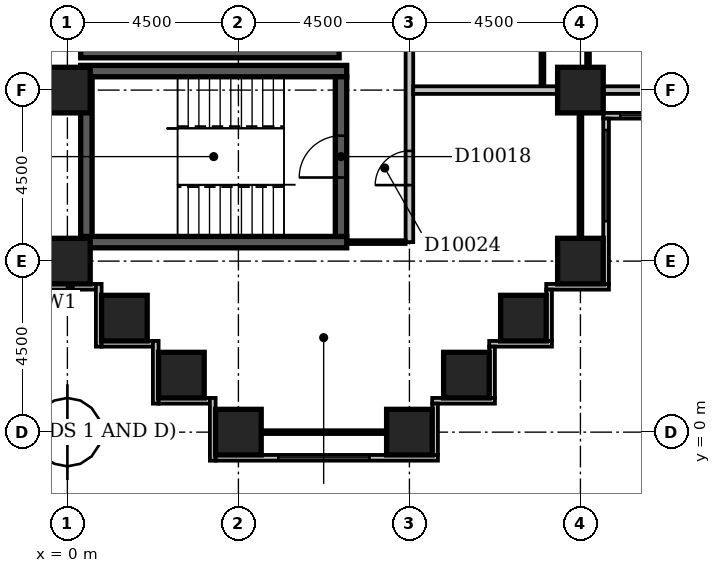
"""IFC4 building model, lengths in metres.
Left out: names, types, materials, properties, quantities, classifications, styles, units other than length and angle.
Written with IfcOpenShell. Run it as: python <this file> out.ifc"""

import sys

from ifc_helpers import new_model, si_unit, direction, frame, frame_2d, origin, origin_2d, place, context, subcontext, project, spatial, rectangle, extrude, element, fill, save


model = new_model("IFC4")
c1 = context("Model", 3, precision=1e-05, world=origin(), true_north=direction((0.0, 1.0)))
c2 = subcontext(c1, "Body", "Model", "MODEL_VIEW")
j1 = project(units=[si_unit("LENGTHUNIT", "METRE"), si_unit("PLANEANGLEUNIT", "RADIAN")], contexts=[c1])
p1 = place(None, origin())
s1 = spatial("IfcSite", under=j1, at=p1, CompositionType="ELEMENT")
p2 = place(p1, origin())
s2 = spatial("IfcBuilding", under=s1, at=p2, CompositionType="ELEMENT")
p3 = place(p2, frame((0.0, 0.0, 47.0)))
s3 = spatial("IfcBuildingStorey", under=s2, at=p3, CompositionType="ELEMENT", Elevation=47.0)
for number, where, z_axis, x_axis in (
    (1, (0.35, 5.0, -0.3), (0.0, 0.0, 1.0), (1.0, 0.0, 0.0)),
    (2, (0.35, 9.5, -0.3), (0.0, 0.0, 1.0), (1.0, 0.0, 0.0)),
):
    element("IfcWall", number, at=place(p3, frame(where, z_axis=z_axis, x_axis=x_axis)), inside=s3, PredefinedType="SHEAR", context=c2, shape_type="SweptSolid", body=[
        extrude(rectangle(XDim=7.0, YDim=0.3, at=frame_2d((3.5, 0.0))), origin(), (0.0, 0.0, 1.0), 3.6),
    ])
p4 = place(p3, frame((0.35, 10.0, -0.3), z_axis=(0.0, 0.0, 1.0), x_axis=(1.0, 0.0, 0.0)))
e3 = element("IfcWall", 3, at=p4, inside=s3, PredefinedType="SHEAR", context=c2, shape_type="SweptSolid", body=[
    extrude(rectangle(XDim=6.8, YDim=0.3, at=frame_2d((3.4, 0.0))), origin(), (0.0, 0.0, 1.0), 3.6),
])
p5 = place(p3, frame((0.5, 5.15, -0.3), z_axis=(0.0, 0.0, 1.0), x_axis=(0.0, 1.0, 0.0)))
e4 = element("IfcWall", 4, at=p5, inside=s3, PredefinedType="SHEAR", context=c2, shape_type="SweptSolid", body=[
    extrude(rectangle(XDim=4.2, YDim=0.3, at=frame_2d((2.1, 0.0))), origin(), (0.0, 0.0, 1.0), 3.6),
])
p6 = place(p3, frame((7.2, 5.15, -0.3), z_axis=(0.0, 0.0, 1.0), x_axis=(0.0, 1.0, 0.0)))
e5 = element("IfcWall", 5, at=p6, inside=s3, PredefinedType="SHEAR", context=c2, shape_type="SweptSolid", body=[
    extrude(rectangle(XDim=4.2, YDim=0.3, at=frame_2d((2.1, 0.0))), origin(), (0.0, 0.0, 1.0), 3.6),
])
p7 = place(p6, frame((1.55, 0.0, 0.3)))
e6 = element("IfcOpeningElement", 6, at=p7, cuts=e5, PredefinedType="OPENING", context=c2, shape_type="SweptSolid", body=[
    extrude(rectangle(XDim=1.1, YDim=2.1, at=frame_2d((0.55, 1.05))), frame((0.0, 0.162, 0.0), z_axis=(0.0, -1.0, 0.0), x_axis=(1.0, 0.0, 0.0)), (0.0, 0.0, 1.0), 0.324),
])
for number, where, z_axis, x_axis in (
    (7, (4.5, 0.0, -0.3), (0.0, 0.0, 1.0), (1.0, 0.0, 0.0)),
    (8, (9.0, 0.0, -0.3), (0.0, 0.0, 1.0), (1.0, 0.0, 0.0)),
    (9, (3.0, 1.5, -0.3), (0.0, 0.0, 1.0), (1.0, 0.0, 0.0)),
    (10, (10.5, 1.5, -0.3), (0.0, 0.0, 1.0), (1.0, 0.0, 0.0)),
    (11, (1.5, 3.0, -0.3), (0.0, 0.0, 1.0), (1.0, 0.0, 0.0)),
    (12, (12.0, 3.0, -0.3), (0.0, 0.0, 1.0), (1.0, 0.0, 0.0)),
    (13, (0.0, 4.5, -0.3), (0.0, 0.0, 1.0), (1.0, 0.0, 0.0)),
    (14, (13.5, 4.5, -0.3), (0.0, 0.0, 1.0), (1.0, 0.0, 0.0)),
    (15, (0.0, 9.0, -0.3), (0.0, 0.0, 1.0), (1.0, 0.0, 0.0)),
    (16, (13.5, 9.0, -0.3), (0.0, 0.0, 1.0), (1.0, 0.0, 0.0)),
):
    element("IfcColumn", number, at=place(p3, frame(where, z_axis=z_axis, x_axis=x_axis)), inside=s3, PredefinedType="COLUMN", context=c2, shape_type="SweptSolid", body=[
        extrude(rectangle(XDim=1.2, YDim=1.2, at=origin_2d()), origin(), (0.0, 0.0, 1.0), 3.6),
    ])
p8 = place(p3, frame((9.675, -0.6, 0.0), z_axis=(0.0, 0.0, 1.0), x_axis=(0.0, 1.0, 0.0)))
e17 = element("IfcWall", 17, at=p8, inside=s3, PredefinedType="STANDARD", context=c2, shape_type="SweptSolid", body=[
    extrude(rectangle(XDim=1.35, YDim=0.15, at=frame_2d((0.675, 0.0))), origin(), (0.0, 0.0, 1.0), 2.7),
])
p9 = place(p3, frame((9.6, 0.825, 0.0), z_axis=(0.0, 0.0, 1.0), x_axis=(1.0, 0.0, 0.0)))
e18 = element("IfcWall", 18, at=p9, inside=s3, PredefinedType="STANDARD", context=c2, shape_type="SweptSolid", body=[
    extrude(rectangle(XDim=1.65, YDim=0.15, at=frame_2d((0.825, 0.0))), origin(), (0.0, 0.0, 1.0), 2.7),
])
p10 = place(p3, frame((11.175, 0.9, 0.0), z_axis=(0.0, 0.0, 1.0), x_axis=(0.0, 1.0, 0.0)))
e19 = element("IfcWall", 19, at=p10, inside=s3, PredefinedType="STANDARD", context=c2, shape_type="SweptSolid", body=[
    extrude(rectangle(XDim=1.35, YDim=0.15, at=frame_2d((0.675, 0.0))), origin(), (0.0, 0.0, 1.0), 2.7),
])
p11 = place(p3, frame((11.1, 2.325, 0.0), z_axis=(0.0, 0.0, 1.0), x_axis=(1.0, 0.0, 0.0)))
e20 = element("IfcWall", 20, at=p11, inside=s3, PredefinedType="STANDARD", context=c2, shape_type="SweptSolid", body=[
    extrude(rectangle(XDim=1.65, YDim=0.15, at=frame_2d((0.825, 0.0))), origin(), (0.0, 0.0, 1.0), 2.7),
])
p12 = place(p3, frame((12.675, 2.4, 0.0), z_axis=(0.0, 0.0, 1.0), x_axis=(0.0, 1.0, 0.0)))
e21 = element("IfcWall", 21, at=p12, inside=s3, PredefinedType="STANDARD", context=c2, shape_type="SweptSolid", body=[
    extrude(rectangle(XDim=1.35, YDim=0.15, at=frame_2d((0.675, 0.0))), origin(), (0.0, 0.0, 1.0), 2.7),
])
p13 = place(p3, frame((12.6, 3.825, 0.0), z_axis=(0.0, 0.0, 1.0), x_axis=(1.0, 0.0, 0.0)))
e22 = element("IfcWall", 22, at=p13, inside=s3, PredefinedType="STANDARD", context=c2, shape_type="SweptSolid", body=[
    extrude(rectangle(XDim=1.65, YDim=0.15, at=frame_2d((0.825, 0.0))), origin(), (0.0, 0.0, 1.0), 2.7),
])
p14 = place(p3, frame((14.175, 3.9, 0.0), z_axis=(0.0, 0.0, 1.0), x_axis=(0.0, 1.0, 0.0)))
e23 = element("IfcWall", 23, at=p14, inside=s3, PredefinedType="STANDARD", context=c2, shape_type="SweptSolid", body=[
    extrude(rectangle(XDim=4.35, YDim=0.15, at=frame_2d((2.175, 0.0))), origin(), (0.0, 0.0, 1.0), 2.7),
])
p15 = place(p14, frame((1.65, 0.0, 0.6)))
e24 = element("IfcOpeningElement", 24, at=p15, cuts=e23, PredefinedType="OPENING", context=c2, shape_type="SweptSolid", body=[
    extrude(rectangle(XDim=2.4, YDim=1.8, at=frame_2d((1.2, 0.9))), frame((0.0, 0.087, 0.0), z_axis=(0.0, -1.0, 0.0), x_axis=(1.0, 0.0, 0.0)), (0.0, 0.0, 1.0), 0.174),
])
p16 = place(p3, frame((14.1, 8.325, 0.0), z_axis=(0.0, 0.0, 1.0), x_axis=(1.0, 0.0, 0.0)))
e25 = element("IfcWall", 25, at=p16, inside=s3, PredefinedType="STANDARD", context=c2, shape_type="SweptSolid", body=[
    extrude(rectangle(XDim=4.65, YDim=0.15, at=frame_2d((2.325, 0.0))), origin(), (0.0, 0.0, 1.0), 2.7),
])
p17 = place(p16, frame((0.45, 0.0, 0.6)))
e26 = element("IfcOpeningElement", 26, at=p17, cuts=e25, PredefinedType="OPENING", context=c2, shape_type="SweptSolid", body=[
    extrude(rectangle(XDim=2.4, YDim=1.8, at=frame_2d((1.2, 0.9))), frame((0.0, 0.087, 0.0), z_axis=(0.0, -1.0, 0.0), x_axis=(1.0, 0.0, 0.0)), (0.0, 0.0, 1.0), 0.174),
])
p18 = place(p3, frame((-0.6, 3.825, 0.0), z_axis=(0.0, 0.0, 1.0), x_axis=(1.0, 0.0, 0.0)))
e27 = element("IfcWall", 27, at=p18, inside=s3, PredefinedType="STANDARD", context=c2, shape_type="SweptSolid", body=[
    extrude(rectangle(XDim=1.35, YDim=0.15, at=frame_2d((0.675, 0.0))), origin(), (0.0, 0.0, 1.0), 2.7),
])
p19 = place(p3, frame((0.825, 3.9, 0.0), z_axis=(0.0, 0.0, 1.0), x_axis=(0.0, -1.0, 0.0)))
e28 = element("IfcWall", 28, at=p19, inside=s3, PredefinedType="STANDARD", context=c2, shape_type="SweptSolid", body=[
    extrude(rectangle(XDim=1.65, YDim=0.15, at=frame_2d((0.825, 0.0))), origin(), (0.0, 0.0, 1.0), 2.7),
])
p20 = place(p3, frame((0.9, 2.325, 0.0), z_axis=(0.0, 0.0, 1.0), x_axis=(1.0, 0.0, 0.0)))
e29 = element("IfcWall", 29, at=p20, inside=s3, PredefinedType="STANDARD", context=c2, shape_type="SweptSolid", body=[
    extrude(rectangle(XDim=1.35, YDim=0.15, at=frame_2d((0.675, 0.0))), origin(), (0.0, 0.0, 1.0), 2.7),
])
p21 = place(p3, frame((2.325, 2.4, 0.0), z_axis=(0.0, 0.0, 1.0), x_axis=(0.0, -1.0, 0.0)))
e30 = element("IfcWall", 30, at=p21, inside=s3, PredefinedType="STANDARD", context=c2, shape_type="SweptSolid", body=[
    extrude(rectangle(XDim=1.65, YDim=0.15, at=frame_2d((0.825, 0.0))), origin(), (0.0, 0.0, 1.0), 2.7),
])
p22 = place(p3, frame((2.4, 0.825, 0.0), z_axis=(0.0, 0.0, 1.0), x_axis=(1.0, 0.0, 0.0)))
e31 = element("IfcWall", 31, at=p22, inside=s3, PredefinedType="STANDARD", context=c2, shape_type="SweptSolid", body=[
    extrude(rectangle(XDim=1.35, YDim=0.15, at=frame_2d((0.675, 0.0))), origin(), (0.0, 0.0, 1.0), 2.7),
])
p23 = place(p3, frame((3.825, 0.9, 0.0), z_axis=(0.0, 0.0, 1.0), x_axis=(0.0, -1.0, 0.0)))
e32 = element("IfcWall", 32, at=p23, inside=s3, PredefinedType="STANDARD", context=c2, shape_type="SweptSolid", body=[
    extrude(rectangle(XDim=1.65, YDim=0.15, at=frame_2d((0.825, 0.0))), origin(), (0.0, 0.0, 1.0), 2.7),
])
p24 = place(p3, frame((3.9, -0.675, 0.0), z_axis=(0.0, 0.0, 1.0), x_axis=(1.0, 0.0, 0.0)))
e33 = element("IfcWall", 33, at=p24, inside=s3, PredefinedType="STANDARD", context=c2, shape_type="SweptSolid", body=[
    extrude(rectangle(XDim=5.85, YDim=0.15, at=frame_2d((2.925, 0.0))), origin(), (0.0, 0.0, 1.0), 2.7),
])
p25 = place(p24, frame((1.65, 0.0, 0.6)))
e34 = element("IfcOpeningElement", 34, at=p25, cuts=e33, PredefinedType="OPENING", context=c2, shape_type="SweptSolid", body=[
    extrude(rectangle(XDim=2.4, YDim=1.8, at=frame_2d((1.2, 0.9))), frame((0.0, 0.087, 0.0), z_axis=(0.0, -1.0, 0.0), x_axis=(1.0, 0.0, 0.0)), (0.0, 0.0, 1.0), 0.174),
])
p26 = place(p3, frame((5.1, 0.0, 0.0), z_axis=(0.0, 0.0, 1.0), x_axis=(1.0, 0.0, 0.0)))
e35 = element("IfcWall", 35, at=p26, inside=s3, PredefinedType="PARTITIONING", context=c2, shape_type="SweptSolid", body=[
    extrude(rectangle(XDim=3.3, YDim=0.1, at=frame_2d((1.65, 0.0))), origin(), (0.0, 0.0, 1.0), 2.7),
])
p27 = place(p3, frame((0.0, 4.4, 0.0), z_axis=(0.0, 0.0, 1.0), x_axis=(0.0, 1.0, 0.0)))
e36 = element("IfcWall", 36, at=p27, inside=s3, PredefinedType="PARTITIONING", context=c2, shape_type="SweptSolid", body=[
    extrude(rectangle(XDim=0.7, YDim=0.1, at=frame_2d((0.35, 0.0))), origin(), (0.0, 0.0, 1.0), 2.7),
])
p28 = place(p3, frame((7.349, 5.0, 0.0), z_axis=(0.0, 0.0, 1.0), x_axis=(1.0, 0.0, 0.0)))
e37 = element("IfcWall", 37, at=p28, inside=s3, PredefinedType="PARTITIONING", context=c2, shape_type="SweptSolid", body=[
    extrude(rectangle(XDim=1.551, YDim=0.1, at=frame_2d((0.775, 0.0))), origin(), (0.0, 0.0, 1.0), 3.3),
])
p29 = place(p3, frame((9.0, 5.0, 0.0), z_axis=(0.0, 0.0, 1.0), x_axis=(0.0, 1.0, 0.0)))
e38 = element("IfcWall", 38, at=p29, inside=s3, PredefinedType="PARTITIONING", context=c2, shape_type="SweptSolid", body=[
    extrude(rectangle(XDim=44.5, YDim=0.2, at=frame_2d((22.25, 0.0))), origin(), (0.0, 0.0, 1.0), 3.3),
])
p30 = place(p29, frame((28.45, 0.0, 0.0)))
e39 = element("IfcOpeningElement", 39, at=p30, cuts=e38, PredefinedType="OPENING", context=c2, shape_type="SweptSolid", body=[
    extrude(rectangle(XDim=1.0, YDim=2.1, at=frame_2d((0.5, 1.05))), frame((0.0, 0.112, 0.0), z_axis=(0.0, -1.0, 0.0), x_axis=(1.0, 0.0, 0.0)), (0.0, 0.0, 1.0), 0.224),
])
p31 = place(p29, frame((17.8, 0.0, 0.0)))
e40 = element("IfcOpeningElement", 40, at=p31, cuts=e38, PredefinedType="OPENING", context=c2, shape_type="SweptSolid", body=[
    extrude(rectangle(XDim=1.0, YDim=2.1, at=frame_2d((0.5, 1.05))), frame((0.0, 0.112, 0.0), z_axis=(0.0, -1.0, 0.0), x_axis=(1.0, 0.0, 0.0)), (0.0, 0.0, 1.0), 0.224),
])
p32 = place(p29, frame((14.55, 0.0, 0.0)))
e41 = element("IfcOpeningElement", 41, at=p32, cuts=e38, PredefinedType="OPENING", context=c2, shape_type="SweptSolid", body=[
    extrude(rectangle(XDim=1.0, YDim=2.1, at=frame_2d((0.5, 1.05))), frame((0.0, 0.112, 0.0), z_axis=(0.0, -1.0, 0.0), x_axis=(1.0, 0.0, 0.0)), (0.0, 0.0, 1.0), 0.224),
])
p33 = place(p29, frame((11.7, 0.0, 0.0)))
e42 = element("IfcOpeningElement", 42, at=p33, cuts=e38, PredefinedType="OPENING", context=c2, shape_type="SweptSolid", body=[
    extrude(rectangle(XDim=1.0, YDim=2.1, at=frame_2d((0.5, 1.05))), frame((0.0, 0.112, 0.0), z_axis=(0.0, -1.0, 0.0), x_axis=(1.0, 0.0, 0.0)), (0.0, 0.0, 1.0), 0.224),
])
p34 = place(p29, frame((35.0, 0.0, 0.0)))
e43 = element("IfcOpeningElement", 43, at=p34, cuts=e38, PredefinedType="OPENING", context=c2, shape_type="SweptSolid", body=[
    extrude(rectangle(XDim=0.9, YDim=2.1, at=frame_2d((0.45, 1.05))), frame((0.0, 0.112, 0.0), z_axis=(0.0, -1.0, 0.0), x_axis=(1.0, 0.0, 0.0)), (0.0, 0.0, 1.0), 0.224),
])
p35 = place(p29, frame((1.5, 0.0, 0.0)))
e44 = element("IfcOpeningElement", 44, at=p35, cuts=e38, PredefinedType="OPENING", context=c2, shape_type="SweptSolid", body=[
    extrude(rectangle(XDim=0.9, YDim=2.1, at=frame_2d((0.45, 1.05))), frame((0.0, 0.112, 0.0), z_axis=(0.0, -1.0, 0.0), x_axis=(1.0, 0.0, 0.0)), (0.0, 0.0, 1.0), 0.224),
])
p36 = place(p3, frame((13.5, 5.1, 0.0), z_axis=(0.0, 0.0, 1.0), x_axis=(0.0, 1.0, 0.0)))
e45 = element("IfcWall", 45, at=p36, inside=s3, PredefinedType="PARTITIONING", context=c2, shape_type="SweptSolid", body=[
    extrude(rectangle(XDim=3.3, YDim=0.1, at=frame_2d((1.65, 0.0))), origin(), (0.0, 0.0, 1.0), 2.7),
])
p37 = place(p3, frame((9.1, 9.0, 0.0), z_axis=(0.0, 0.0, 1.0), x_axis=(1.0, 0.0, 0.0)))
e46 = element("IfcWall", 46, at=p37, inside=s3, PredefinedType="PARTITIONING", context=c2, shape_type="SweptSolid", body=[
    extrude(rectangle(XDim=3.8, YDim=0.2, at=frame_2d((1.9, 0.0))), origin(), (0.0, 0.0, 1.0), 3.3),
])
p38 = place(p3, frame((14.1, 9.0, 0.0), z_axis=(0.0, 0.0, 1.0), x_axis=(1.0, 0.0, 0.0)))
e47 = element("IfcWall", 47, at=p38, inside=s3, PredefinedType="PARTITIONING", context=c2, shape_type="SweptSolid", body=[
    extrude(rectangle(XDim=3.3, YDim=0.2, at=frame_2d((1.65, 0.0))), origin(), (0.0, 0.0, 1.0), 2.7),
])
p39 = place(p3, frame((12.5, 9.1, 0.0), z_axis=(0.0, 0.0, 1.0), x_axis=(0.0, 1.0, 0.0)))
e48 = element("IfcWall", 48, at=p39, inside=s3, PredefinedType="PARTITIONING", context=c2, shape_type="SweptSolid", body=[
    extrude(rectangle(XDim=7.3, YDim=0.1, at=frame_2d((3.65, 0.0))), origin(), (0.0, 0.0, 1.0), 3.3),
])
p40 = place(p39, frame((5.7, 0.0, 0.0)))
e49 = element("IfcOpeningElement", 49, at=p40, cuts=e48, PredefinedType="OPENING", context=c2, shape_type="SweptSolid", body=[
    extrude(rectangle(XDim=0.8, YDim=2.1, at=frame_2d((0.4, 1.05))), frame((0.0, 0.062, 0.0), z_axis=(0.0, -1.0, 0.0), x_axis=(1.0, 0.0, 0.0)), (0.0, 0.0, 1.0), 0.124),
])
p41 = place(p39, frame((1.95, 0.0, 0.0)))
e50 = element("IfcOpeningElement", 50, at=p41, cuts=e48, PredefinedType="OPENING", context=c2, shape_type="SweptSolid", body=[
    extrude(rectangle(XDim=0.9, YDim=2.1, at=frame_2d((0.45, 1.05))), frame((0.0, 0.062, 0.0), z_axis=(0.0, -1.0, 0.0), x_axis=(1.0, 0.0, 0.0)), (0.0, 0.0, 1.0), 0.124),
])
p42 = place(p3, frame((13.7, 9.6, 0.0), z_axis=(0.0, 0.0, 1.0), x_axis=(0.0, 1.0, 0.0)))
e51 = element("IfcWall", 51, at=p42, inside=s3, PredefinedType="PARTITIONING", context=c2, shape_type="SweptSolid", body=[
    extrude(rectangle(XDim=8.3, YDim=0.1, at=frame_2d((4.15, 0.0))), origin(), (0.0, 0.0, 1.0), 3.3),
])
p43 = place(p42, frame((1.2, 0.0, 0.0)))
e52 = element("IfcOpeningElement", 52, at=p43, cuts=e51, PredefinedType="OPENING", context=c2, shape_type="SweptSolid", body=[
    extrude(rectangle(XDim=0.9, YDim=2.1, at=frame_2d((0.45, 1.05))), frame((0.0, 0.062, 0.0), z_axis=(0.0, -1.0, 0.0), x_axis=(1.0, 0.0, 0.0)), (0.0, 0.0, 1.0), 0.124),
])
p44 = place(p42, frame((5.7, 0.0, 0.0)))
e53 = element("IfcOpeningElement", 53, at=p44, cuts=e51, PredefinedType="OPENING", context=c2, shape_type="SweptSolid", body=[
    extrude(rectangle(XDim=0.9, YDim=2.1, at=frame_2d((0.45, 1.05))), frame((0.0, 0.062, 0.0), z_axis=(0.0, -1.0, 0.0), x_axis=(1.0, 0.0, 0.0)), (0.0, 0.0, 1.0), 0.124),
])
p45 = place(p15, origin())
e54 = element("IfcWindow", 54, at=p45, inside=s3, PartitioningType="SINGLE_PANEL", PredefinedType="WINDOW", context=c2, shape_type="SweptSolid", body=[
    extrude(rectangle(XDim=2.4, YDim=1.8, at=frame_2d((1.2, 0.9))), frame((0.0, 0.03, 0.0), z_axis=(0.0, -1.0, 0.0), x_axis=(1.0, 0.0, 0.0)), (0.0, 0.0, 1.0), 0.06),
])
fill(e24, e54)
p46 = place(p17, origin())
e55 = element("IfcWindow", 55, at=p46, inside=s3, PartitioningType="SINGLE_PANEL", PredefinedType="WINDOW", context=c2, shape_type="SweptSolid", body=[
    extrude(rectangle(XDim=2.4, YDim=1.8, at=frame_2d((1.2, 0.9))), frame((0.0, 0.03, 0.0), z_axis=(0.0, -1.0, 0.0), x_axis=(1.0, 0.0, 0.0)), (0.0, 0.0, 1.0), 0.06),
])
fill(e26, e55)
p47 = place(p25, origin())
e56 = element("IfcWindow", 56, at=p47, inside=s3, PartitioningType="SINGLE_PANEL", PredefinedType="WINDOW", context=c2, shape_type="SweptSolid", body=[
    extrude(rectangle(XDim=2.4, YDim=1.8, at=frame_2d((1.2, 0.9))), frame((0.0, 0.03, 0.0), z_axis=(0.0, -1.0, 0.0), x_axis=(1.0, 0.0, 0.0)), (0.0, 0.0, 1.0), 0.06),
])
fill(e34, e56)
p48 = place(p7, origin())
e57 = element("IfcDoor", 57, at=p48, inside=s3, OperationType="SINGLE_SWING_LEFT", PredefinedType="DOOR", context=c2, shape_type="SweptSolid", body=[
    extrude(rectangle(XDim=1.1, YDim=2.1, at=frame_2d((0.55, 1.05))), frame((0.0, 0.025, 0.0), z_axis=(0.0, -1.0, 0.0), x_axis=(1.0, 0.0, 0.0)), (0.0, 0.0, 1.0), 0.05),
])
fill(e6, e57)
p49 = place(p35, origin())
e58 = element("IfcDoor", 58, at=p49, inside=s3, OperationType="SINGLE_SWING_LEFT", PredefinedType="DOOR", context=c2, shape_type="SweptSolid", body=[
    extrude(rectangle(XDim=0.9, YDim=2.1, at=frame_2d((0.45, 1.05))), frame((0.0, 0.025, 0.0), z_axis=(0.0, -1.0, 0.0), x_axis=(1.0, 0.0, 0.0)), (0.0, 0.0, 1.0), 0.05),
])
fill(e44, e58)
save(model, sys.argv[1])
